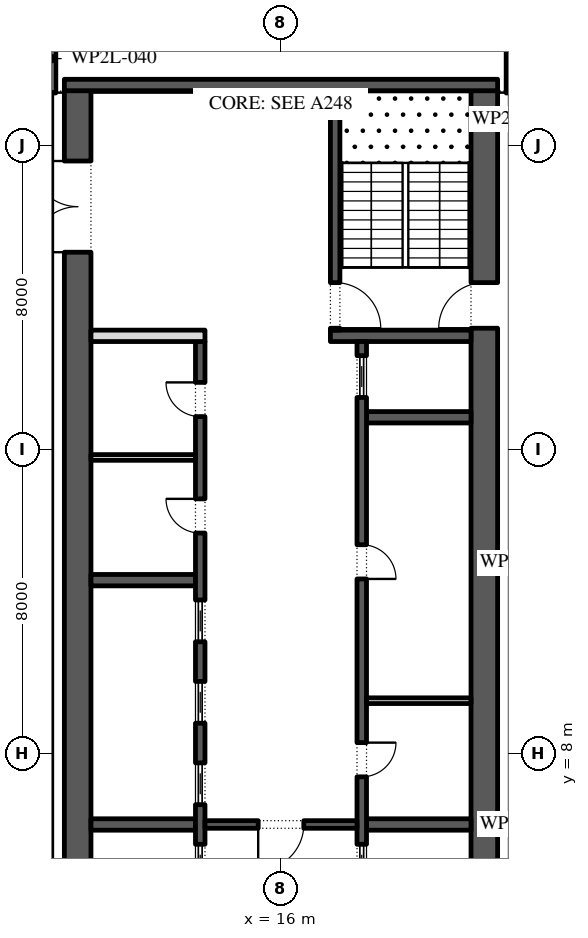
"""IFC4 building model, lengths in metres.
Left out: names, types, materials, properties, quantities, classifications, styles, units other than length and angle.
Written with IfcOpenShell. Run it as: python <this file> out.ifc"""

import sys

from ifc_helpers import new_model, si_unit, direction, frame, frame_2d, origin, place, context, subcontext, project, spatial, rectangle, extrude, element, fill, save


model = new_model("IFC4")
c1 = context("Model", 3, precision=1e-05, world=origin(), true_north=direction((0.0, 1.0)))
c2 = subcontext(c1, "Body", "Model", "MODEL_VIEW")
j1 = project(units=[si_unit("LENGTHUNIT", "METRE"), si_unit("PLANEANGLEUNIT", "RADIAN")], contexts=[c1])
p1 = place(None, origin())
s1 = spatial("IfcSite", under=j1, at=p1, CompositionType="ELEMENT")
p2 = place(p1, origin())
s2 = spatial("IfcBuilding", under=s1, at=p2, CompositionType="ELEMENT")
p3 = place(p2, frame((0.0, 0.0, 205.2)))
s3 = spatial("IfcBuildingStorey", under=s2, at=p3, CompositionType="ELEMENT", Elevation=205.2)
p4 = place(p3, frame((33.157, -5.092, 0.0), z_axis=(0.0, 0.0, 1.0), x_axis=(-0.224950279389, 0.974370243697, 0.0)))
e1 = element("IfcWall", 1, at=p4, inside=s3, PredefinedType="STANDARD", context=c2, shape_type="SweptSolid", body=[
    extrude(rectangle(XDim=49.5, YDim=0.3, at=frame_2d((24.75, 0.0))), origin(), (0.0, 0.0, 1.0), 4.0),
])
p5 = place(p4, frame((2.207, 0.0, 0.0)))
e2 = element("IfcOpeningElement", 2, at=p5, cuts=e1, PredefinedType="OPENING", context=c2, shape_type="SweptSolid", body=[
    extrude(rectangle(XDim=2.4, YDim=3.125, at=frame_2d((1.2, 1.562))), frame((0.0, 0.16, 0.0), z_axis=(0.0, -1.0, 0.0), x_axis=(1.0, 0.0, 0.0)), (0.0, 0.0, 1.0), 0.32),
])
p6 = place(p4, frame((8.121, 0.0, 0.45)))
e3 = element("IfcOpeningElement", 3, at=p6, cuts=e1, PredefinedType="OPENING", context=c2, shape_type="SweptSolid", body=[
    extrude(rectangle(XDim=4.5, YDim=2.875, at=frame_2d((2.25, 1.438))), frame((0.0, 0.16, 0.0), z_axis=(0.0, -1.0, 0.0), x_axis=(1.0, 0.0, 0.0)), (0.0, 0.0, 1.0), 0.32),
])
p7 = place(p4, frame((15.236, 0.0, 0.45)))
e4 = element("IfcOpeningElement", 4, at=p7, cuts=e1, PredefinedType="OPENING", context=c2, shape_type="SweptSolid", body=[
    extrude(rectangle(XDim=4.5, YDim=2.875, at=frame_2d((2.25, 1.438))), frame((0.0, 0.16, 0.0), z_axis=(0.0, -1.0, 0.0), x_axis=(1.0, 0.0, 0.0)), (0.0, 0.0, 1.0), 0.32),
])
p8 = place(p4, frame((22.35, 0.0, 0.45)))
e5 = element("IfcOpeningElement", 5, at=p8, cuts=e1, PredefinedType="OPENING", context=c2, shape_type="SweptSolid", body=[
    extrude(rectangle(XDim=4.5, YDim=3.0, at=frame_2d((2.25, 1.5))), frame((0.0, 0.16, 0.0), z_axis=(0.0, -1.0, 0.0), x_axis=(1.0, 0.0, 0.0)), (0.0, 0.0, 1.0), 0.32),
])
p9 = place(p4, frame((30.514, 0.0, 0.0)))
e6 = element("IfcOpeningElement", 6, at=p9, cuts=e1, PredefinedType="OPENING", context=c2, shape_type="SweptSolid", body=[
    extrude(rectangle(XDim=2.4, YDim=3.45, at=frame_2d((1.2, 1.725))), frame((0.0, 0.16, 0.0), z_axis=(0.0, -1.0, 0.0), x_axis=(1.0, 0.0, 0.0)), (0.0, 0.0, 1.0), 0.32),
])
p10 = place(p4, frame((36.579, 0.0, 0.45)))
e7 = element("IfcOpeningElement", 7, at=p10, cuts=e1, PredefinedType="OPENING", context=c2, shape_type="SweptSolid", body=[
    extrude(rectangle(XDim=4.5, YDim=3.05, at=frame_2d((2.25, 1.525))), frame((0.0, 0.16, 0.0), z_axis=(0.0, -1.0, 0.0), x_axis=(1.0, 0.0, 0.0)), (0.0, 0.0, 1.0), 0.32),
])
p11 = place(p4, frame((43.693, 0.0, 0.45)))
e8 = element("IfcOpeningElement", 8, at=p11, cuts=e1, PredefinedType="OPENING", context=c2, shape_type="SweptSolid", body=[
    extrude(rectangle(XDim=4.5, YDim=3.05, at=frame_2d((2.25, 1.525))), frame((0.0, 0.16, 0.0), z_axis=(0.0, -1.0, 0.0), x_axis=(1.0, 0.0, 0.0)), (0.0, 0.0, 1.0), 0.32),
])
p12 = place(p3, frame((21.35, -2.45, 0.0), z_axis=(0.0, 0.0, 1.0), x_axis=(0.0, 1.0, 0.0)))
e9 = element("IfcWall", 9, at=p12, inside=s3, PredefinedType="SHEAR", context=c2, shape_type="SweptSolid", body=[
    extrude(rectangle(XDim=27.9, YDim=0.7, at=frame_2d((13.95, 0.0))), origin(), (0.0, 0.0, 1.0), 4.0),
])
p13 = place(p12, frame((5.05, 0.0, 0.0)))
e10 = element("IfcOpeningElement", 10, at=p13, cuts=e9, PredefinedType="OPENING", context=c2, shape_type="SweptSolid", body=[
    extrude(rectangle(XDim=1.2, YDim=2.1, at=frame_2d((0.6, 1.05))), frame((0.0, 0.36, 0.0), z_axis=(0.0, -1.0, 0.0), x_axis=(1.0, 0.0, 0.0)), (0.0, 0.0, 1.0), 0.72),
])
p14 = place(p12, frame((21.65, 0.0, 0.0)))
e11 = element("IfcOpeningElement", 11, at=p14, cuts=e9, PredefinedType="OPENING", context=c2, shape_type="SweptSolid", body=[
    extrude(rectangle(XDim=1.2, YDim=2.1, at=frame_2d((0.6, 1.05))), frame((0.0, 0.36, 0.0), z_axis=(0.0, -1.0, 0.0), x_axis=(1.0, 0.0, 0.0)), (0.0, 0.0, 1.0), 0.72),
])
p15 = place(p3, frame((10.65, -2.45, 0.0), z_axis=(0.0, 0.0, 1.0), x_axis=(0.0, 1.0, 0.0)))
e12 = element("IfcWall", 12, at=p15, inside=s3, PredefinedType="SHEAR", context=c2, shape_type="SweptSolid", body=[
    extrude(rectangle(XDim=27.9, YDim=0.7, at=frame_2d((13.95, 0.0))), origin(), (0.0, 0.0, 1.0), 4.0),
])
p16 = place(p15, frame((23.65, 0.0, 0.0)))
e13 = element("IfcOpeningElement", 13, at=p16, cuts=e12, PredefinedType="OPENING", context=c2, shape_type="SweptSolid", body=[
    extrude(rectangle(XDim=2.4, YDim=2.1, at=frame_2d((1.2, 1.05))), frame((0.0, 0.36, 0.0), z_axis=(0.0, -1.0, 0.0), x_axis=(1.0, 0.0, 0.0)), (0.0, 0.0, 1.0), 0.72),
])
p17 = place(p15, frame((1.087, 0.0, 0.0)))
e14 = element("IfcOpeningElement", 14, at=p17, cuts=e12, PredefinedType="OPENING", context=c2, shape_type="SweptSolid", body=[
    extrude(rectangle(XDim=0.9, YDim=2.1, at=frame_2d((0.45, 1.05))), frame((0.0, 0.36, 0.0), z_axis=(0.0, -1.0, 0.0), x_axis=(1.0, 0.0, 0.0)), (0.0, 0.0, 1.0), 0.72),
])
p18 = place(p15, frame((4.262, 0.0, 0.0)))
e15 = element("IfcOpeningElement", 15, at=p18, cuts=e12, PredefinedType="OPENING", context=c2, shape_type="SweptSolid", body=[
    extrude(rectangle(XDim=1.0, YDim=2.1, at=frame_2d((0.5, 1.05))), frame((0.0, 0.36, 0.0), z_axis=(0.0, -1.0, 0.0), x_axis=(1.0, 0.0, 0.0)), (0.0, 0.0, 1.0), 0.72),
])
p19 = place(p3, frame((10.3, 25.6, 0.0), z_axis=(0.0, 0.0, 1.0), x_axis=(1.0, 0.0, 0.0)))
e16 = element("IfcWall", 16, at=p19, inside=s3, PredefinedType="SHEAR", context=c2, shape_type="SweptSolid", body=[
    extrude(rectangle(XDim=11.4, YDim=0.3, at=frame_2d((5.7, 0.0))), origin(), (0.0, 0.0, 1.0), 4.0),
])
p20 = place(p3, frame((17.3, 19.0, 0.0), z_axis=(0.0, 0.0, 1.0), x_axis=(1.0, 0.0, 0.0)))
e17 = element("IfcWall", 17, at=p20, inside=s3, PredefinedType="SHEAR", context=c2, shape_type="SweptSolid", body=[
    extrude(rectangle(XDim=3.7, YDim=0.3, at=frame_2d((1.85, 0.0))), origin(), (0.0, 0.0, 1.0), 4.0),
])
p21 = place(p3, frame((17.425, 19.15, 0.0), z_axis=(0.0, 0.0, 1.0), x_axis=(0.0, 1.0, 0.0)))
e18 = element("IfcWall", 18, at=p21, inside=s3, PredefinedType="SHEAR", context=c2, shape_type="SweptSolid", body=[
    extrude(rectangle(XDim=6.3, YDim=0.25, at=frame_2d((3.15, 0.0))), origin(), (0.0, 0.0, 1.0), 4.0),
])
p22 = place(p21, frame((0.05, 0.0, 0.0)))
e19 = element("IfcOpeningElement", 19, at=p22, cuts=e18, PredefinedType="OPENING", context=c2, shape_type="SweptSolid", body=[
    extrude(rectangle(XDim=1.2, YDim=2.1, at=frame_2d((0.6, 1.05))), frame((0.0, 0.135, 0.0), z_axis=(0.0, -1.0, 0.0), x_axis=(1.0, 0.0, 0.0)), (0.0, 0.0, 1.0), 0.27),
])
for number, where, z_axis, x_axis in (
    (20, (18.25, 6.143, 0.0), (0.0, 0.0, 1.0), (1.0, 0.0, 0.0)),
    (21, (18.25, 16.857, 0.0), (0.0, 0.0, 1.0), (1.0, 0.0, 0.0)),
):
    element("IfcWall", number, at=place(p3, frame(where, z_axis=z_axis, x_axis=x_axis)), inside=s3, PredefinedType="SHEAR", context=c2, shape_type="SweptSolid", body=[
        extrude(rectangle(XDim=2.75, YDim=0.3, at=frame_2d((1.375, 0.0))), origin(), (0.0, 0.0, 1.0), 4.0),
    ])
p23 = place(p3, frame((18.125, 4.15, 0.0), z_axis=(0.0, 0.0, 1.0), x_axis=(0.0, 1.0, 0.0)))
e22 = element("IfcWall", 22, at=p23, inside=s3, PredefinedType="SHEAR", context=c2, shape_type="SweptSolid", body=[
    extrude(rectangle(XDim=14.7, YDim=0.25, at=frame_2d((7.35, 0.0))), origin(), (0.0, 0.0, 1.0), 4.0),
])
p24 = place(p23, frame((3.246, 0.0, 0.0)))
e23 = element("IfcOpeningElement", 23, at=p24, cuts=e22, PredefinedType="OPENING", context=c2, shape_type="SweptSolid", body=[
    extrude(rectangle(XDim=0.9, YDim=2.1, at=frame_2d((0.45, 1.05))), frame((0.0, 0.135, 0.0), z_axis=(0.0, -1.0, 0.0), x_axis=(1.0, 0.0, 0.0)), (0.0, 0.0, 1.0), 0.27),
])
p25 = place(p23, frame((8.454, 0.0, 0.0)))
e24 = element("IfcOpeningElement", 24, at=p25, cuts=e22, PredefinedType="OPENING", context=c2, shape_type="SweptSolid", body=[
    extrude(rectangle(XDim=0.9, YDim=2.1, at=frame_2d((0.45, 1.05))), frame((0.0, 0.135, 0.0), z_axis=(0.0, -1.0, 0.0), x_axis=(1.0, 0.0, 0.0)), (0.0, 0.0, 1.0), 0.27),
])
p26 = place(p23, frame((0.371, 0.0, 0.0)))
e25 = element("IfcOpeningElement", 25, at=p26, cuts=e22, PredefinedType="OPENING", context=c2, shape_type="SweptSolid", body=[
    extrude(rectangle(XDim=1.1, YDim=2.1, at=frame_2d((0.55, 1.05))), frame((0.0, 0.135, 0.0), z_axis=(0.0, -1.0, 0.0), x_axis=(1.0, 0.0, 0.0)), (0.0, 0.0, 1.0), 0.27),
])
p27 = place(p23, frame((13.229, 0.0, 0.0)))
e26 = element("IfcOpeningElement", 26, at=p27, cuts=e22, PredefinedType="OPENING", context=c2, shape_type="SweptSolid", body=[
    extrude(rectangle(XDim=1.1, YDim=2.1, at=frame_2d((0.55, 1.05))), frame((0.0, 0.135, 0.0), z_axis=(0.0, -1.0, 0.0), x_axis=(1.0, 0.0, 0.0)), (0.0, 0.0, 1.0), 0.27),
])
p28 = place(p3, frame((18.25, 9.4, 0.0), z_axis=(0.0, 0.0, 1.0), x_axis=(1.0, 0.0, 0.0)))
e27 = element("IfcWall", 27, at=p28, inside=s3, PredefinedType="PARTITIONING", context=c2, shape_type="SweptSolid", body=[
    extrude(rectangle(XDim=2.75, YDim=0.15, at=frame_2d((1.375, 0.0))), origin(), (0.0, 0.0, 1.0), 4.0),
])
for number, where, z_axis, x_axis in (
    (28, (11.0, 6.143, 0.0), (0.0, 0.0, 1.0), (1.0, 0.0, 0.0)),
    (29, (11.0, 12.571, 0.0), (0.0, 0.0, 1.0), (1.0, 0.0, 0.0)),
):
    element("IfcWall", number, at=place(p3, frame(where, z_axis=z_axis, x_axis=x_axis)), inside=s3, PredefinedType="SHEAR", context=c2, shape_type="SweptSolid", body=[
        extrude(rectangle(XDim=2.75, YDim=0.3, at=frame_2d((1.375, 0.0))), origin(), (0.0, 0.0, 1.0), 4.0),
    ])
p29 = place(p3, frame((13.875, -2.45, 0.0), z_axis=(0.0, 0.0, 1.0), x_axis=(0.0, 1.0, 0.0)))
e30 = element("IfcWall", 30, at=p29, inside=s3, PredefinedType="SHEAR", context=c2, shape_type="SweptSolid", body=[
    extrude(rectangle(XDim=21.3, YDim=0.25, at=frame_2d((10.65, 0.0))), origin(), (0.0, 0.0, 1.0), 4.0),
])
p30 = place(p29, frame((16.261, 0.0, 0.0)))
e31 = element("IfcOpeningElement", 31, at=p30, cuts=e30, PredefinedType="OPENING", context=c2, shape_type="SweptSolid", body=[
    extrude(rectangle(XDim=0.9, YDim=2.1, at=frame_2d((0.45, 1.05))), frame((0.0, 0.135, 0.0), z_axis=(0.0, -1.0, 0.0), x_axis=(1.0, 0.0, 0.0)), (0.0, 0.0, 1.0), 0.27),
])
p31 = place(p29, frame((19.325, 0.0, 0.0)))
e32 = element("IfcOpeningElement", 32, at=p31, cuts=e30, PredefinedType="OPENING", context=c2, shape_type="SweptSolid", body=[
    extrude(rectangle(XDim=0.9, YDim=2.1, at=frame_2d((0.45, 1.05))), frame((0.0, 0.135, 0.0), z_axis=(0.0, -1.0, 0.0), x_axis=(1.0, 0.0, 0.0)), (0.0, 0.0, 1.0), 0.27),
])
p32 = place(p29, frame((6.971, 0.0, 0.0)))
e33 = element("IfcOpeningElement", 33, at=p32, cuts=e30, PredefinedType="OPENING", context=c2, shape_type="SweptSolid", body=[
    extrude(rectangle(XDim=1.1, YDim=2.1, at=frame_2d((0.55, 1.05))), frame((0.0, 0.135, 0.0), z_axis=(0.0, -1.0, 0.0), x_axis=(1.0, 0.0, 0.0)), (0.0, 0.0, 1.0), 0.27),
])
p33 = place(p29, frame((9.114, 0.0, 0.0)))
e34 = element("IfcOpeningElement", 34, at=p33, cuts=e30, PredefinedType="OPENING", context=c2, shape_type="SweptSolid", body=[
    extrude(rectangle(XDim=1.1, YDim=2.1, at=frame_2d((0.55, 1.05))), frame((0.0, 0.135, 0.0), z_axis=(0.0, -1.0, 0.0), x_axis=(1.0, 0.0, 0.0)), (0.0, 0.0, 1.0), 0.27),
])
p34 = place(p29, frame((11.257, 0.0, 0.0)))
e35 = element("IfcOpeningElement", 35, at=p34, cuts=e30, PredefinedType="OPENING", context=c2, shape_type="SweptSolid", body=[
    extrude(rectangle(XDim=1.1, YDim=2.1, at=frame_2d((0.55, 1.05))), frame((0.0, 0.135, 0.0), z_axis=(0.0, -1.0, 0.0), x_axis=(1.0, 0.0, 0.0)), (0.0, 0.0, 1.0), 0.27),
])
p35 = place(p29, frame((13.4, 0.0, 0.0)))
e36 = element("IfcOpeningElement", 36, at=p35, cuts=e30, PredefinedType="OPENING", context=c2, shape_type="SweptSolid", body=[
    extrude(rectangle(XDim=1.1, YDim=2.1, at=frame_2d((0.55, 1.05))), frame((0.0, 0.135, 0.0), z_axis=(0.0, -1.0, 0.0), x_axis=(1.0, 0.0, 0.0)), (0.0, 0.0, 1.0), 0.27),
])
p36 = place(p3, frame((11.0, 19.0, 0.0), z_axis=(0.0, 0.0, 1.0), x_axis=(1.0, 0.0, 0.0)))
e37 = element("IfcWall", 37, at=p36, inside=s3, PredefinedType="PARTITIONING", context=c2, shape_type="SweptSolid", body=[
    extrude(rectangle(XDim=3.0, YDim=0.3, at=frame_2d((1.5, 0.0))), origin(), (0.0, 0.0, 1.0), 4.0),
])
p37 = place(p3, frame((11.0, 15.8, 0.0), z_axis=(0.0, 0.0, 1.0), x_axis=(1.0, 0.0, 0.0)))
e38 = element("IfcWall", 38, at=p37, inside=s3, PredefinedType="PARTITIONING", context=c2, shape_type="SweptSolid", body=[
    extrude(rectangle(XDim=2.75, YDim=0.15, at=frame_2d((1.375, 0.0))), origin(), (0.0, 0.0, 1.0), 4.0),
])
p38 = place(p3, frame((14.0, 6.143, 0.0), z_axis=(0.0, 0.0, 1.0), x_axis=(1.0, 0.0, 0.0)))
e39 = element("IfcWall", 39, at=p38, inside=s3, PredefinedType="SHEAR", context=c2, shape_type="SweptSolid", body=[
    extrude(rectangle(XDim=4.0, YDim=0.2, at=frame_2d((2.0, 0.0))), origin(), (0.0, 0.0, 1.0), 4.0),
])
p39 = place(p38, frame((1.4, 0.0, 0.0)))
e40 = element("IfcOpeningElement", 40, at=p39, cuts=e39, PredefinedType="OPENING", context=c2, shape_type="SweptSolid", body=[
    extrude(rectangle(XDim=1.2, YDim=2.1, at=frame_2d((0.6, 1.05))), frame((0.0, 0.11, 0.0), z_axis=(0.0, -1.0, 0.0), x_axis=(1.0, 0.0, 0.0)), (0.0, 0.0, 1.0), 0.22),
])
p40 = place(p3, frame((10.0, 27.2, 0.0), z_axis=(0.0, 0.0, 1.0), x_axis=(0.0, -1.0, 0.0)))
e41 = element("IfcWall", 41, at=p40, inside=s3, PredefinedType="PARTITIONING", context=c2, shape_type="SweptSolid", body=[
    extrude(rectangle(XDim=1.81, YDim=0.15, at=frame_2d((0.905, 0.0))), origin(), (0.0, 0.0, 1.0), 3.02),
])
p41 = place(p3, frame((22.0, 25.39, 0.0), z_axis=(0.0, 0.0, 1.0), x_axis=(0.0, 1.0, 0.0)))
e42 = element("IfcWall", 42, at=p41, inside=s3, PredefinedType="PARTITIONING", context=c2, shape_type="SweptSolid", body=[
    extrude(rectangle(XDim=1.81, YDim=0.15, at=frame_2d((0.905, 0.0))), origin(), (0.0, 0.0, 1.0), 4.0),
])
p42 = place(p24, frame((0.9, -0.2, 0.0), z_axis=(0.0, 0.0, 1.0), x_axis=(-1.0, 0.0, 0.0)))
e43 = element("IfcDoor", 43, at=p42, inside=s3, OperationType="SINGLE_SWING_RIGHT", PredefinedType="DOOR", context=c2, shape_type="SweptSolid", body=[
    extrude(rectangle(XDim=0.9, YDim=2.1, at=frame_2d((0.45, 1.05))), frame((0.0, -0.075, 0.0), z_axis=(0.0, -1.0, 0.0), x_axis=(1.0, 0.0, 0.0)), (0.0, 0.0, 1.0), 0.05),
])
fill(e23, e43)
p43 = place(p25, frame((0.9, -0.2, 0.0), z_axis=(0.0, 0.0, 1.0), x_axis=(-1.0, 0.0, 0.0)))
e44 = element("IfcDoor", 44, at=p43, inside=s3, OperationType="SINGLE_SWING_LEFT", PredefinedType="DOOR", context=c2, shape_type="SweptSolid", body=[
    extrude(rectangle(XDim=0.9, YDim=2.1, at=frame_2d((0.45, 1.05))), frame((0.0, -0.075, 0.0), z_axis=(0.0, -1.0, 0.0), x_axis=(1.0, 0.0, 0.0)), (0.0, 0.0, 1.0), 0.05),
])
fill(e24, e44)
p44 = place(p26, origin())
e45 = element("IfcDoor", 45, at=p44, inside=s3, OperationType="SLIDING_TO_LEFT", PredefinedType="DOOR", context=c2, shape_type="SweptSolid", body=[
    extrude(rectangle(XDim=1.1, YDim=2.1, at=frame_2d((0.55, 1.05))), frame((0.0, 0.025, 0.0), z_axis=(0.0, -1.0, 0.0), x_axis=(1.0, 0.0, 0.0)), (0.0, 0.0, 1.0), 0.05),
])
fill(e25, e45)
p45 = place(p27, origin())
e46 = element("IfcDoor", 46, at=p45, inside=s3, OperationType="SLIDING_TO_LEFT", PredefinedType="DOOR", context=c2, shape_type="SweptSolid", body=[
    extrude(rectangle(XDim=1.1, YDim=2.1, at=frame_2d((0.55, 1.05))), frame((0.0, 0.025, 0.0), z_axis=(0.0, -1.0, 0.0), x_axis=(1.0, 0.0, 0.0)), (0.0, 0.0, 1.0), 0.05),
])
fill(e26, e46)
p46 = place(p30, origin())
e47 = element("IfcDoor", 47, at=p46, inside=s3, OperationType="SINGLE_SWING_LEFT", PredefinedType="DOOR", context=c2, shape_type="SweptSolid", body=[
    extrude(rectangle(XDim=0.9, YDim=2.1, at=frame_2d((0.45, 1.05))), frame((0.0, 0.125, 0.0), z_axis=(0.0, -1.0, 0.0), x_axis=(1.0, 0.0, 0.0)), (0.0, 0.0, 1.0), 0.05),
])
fill(e31, e47)
p47 = place(p31, origin())
e48 = element("IfcDoor", 48, at=p47, inside=s3, OperationType="SINGLE_SWING_LEFT", PredefinedType="DOOR", context=c2, shape_type="SweptSolid", body=[
    extrude(rectangle(XDim=0.9, YDim=2.1, at=frame_2d((0.45, 1.05))), frame((0.0, 0.125, 0.0), z_axis=(0.0, -1.0, 0.0), x_axis=(1.0, 0.0, 0.0)), (0.0, 0.0, 1.0), 0.05),
])
fill(e32, e48)
p48 = place(p32, origin())
e49 = element("IfcDoor", 49, at=p48, inside=s3, OperationType="SLIDING_TO_LEFT", PredefinedType="DOOR", context=c2, shape_type="SweptSolid", body=[
    extrude(rectangle(XDim=1.1, YDim=2.1, at=frame_2d((0.55, 1.05))), frame((0.0, 0.025, 0.0), z_axis=(0.0, -1.0, 0.0), x_axis=(1.0, 0.0, 0.0)), (0.0, 0.0, 1.0), 0.05),
])
fill(e33, e49)
p49 = place(p33, origin())
e50 = element("IfcDoor", 50, at=p49, inside=s3, OperationType="SLIDING_TO_LEFT", PredefinedType="DOOR", context=c2, shape_type="SweptSolid", body=[
    extrude(rectangle(XDim=1.1, YDim=2.1, at=frame_2d((0.55, 1.05))), frame((0.0, 0.025, 0.0), z_axis=(0.0, -1.0, 0.0), x_axis=(1.0, 0.0, 0.0)), (0.0, 0.0, 1.0), 0.05),
])
fill(e34, e50)
p50 = place(p34, origin())
e51 = element("IfcDoor", 51, at=p50, inside=s3, OperationType="SLIDING_TO_LEFT", PredefinedType="DOOR", context=c2, shape_type="SweptSolid", body=[
    extrude(rectangle(XDim=1.1, YDim=2.1, at=frame_2d((0.55, 1.05))), frame((0.0, 0.025, 0.0), z_axis=(0.0, -1.0, 0.0), x_axis=(1.0, 0.0, 0.0)), (0.0, 0.0, 1.0), 0.05),
])
fill(e35, e51)
p51 = place(p35, origin())
e52 = element("IfcDoor", 52, at=p51, inside=s3, OperationType="SLIDING_TO_LEFT", PredefinedType="DOOR", context=c2, shape_type="SweptSolid", body=[
    extrude(rectangle(XDim=1.1, YDim=2.1, at=frame_2d((0.55, 1.05))), frame((0.0, 0.025, 0.0), z_axis=(0.0, -1.0, 0.0), x_axis=(1.0, 0.0, 0.0)), (0.0, 0.0, 1.0), 0.05),
])
fill(e36, e52)
p52 = place(p39, frame((1.2, 0.0, 0.0), z_axis=(0.0, 0.0, 1.0), x_axis=(-1.0, 0.0, 0.0)))
e53 = element("IfcDoor", 53, at=p52, inside=s3, OperationType="SINGLE_SWING_LEFT", PredefinedType="DOOR", context=c2, shape_type="SweptSolid", body=[
    extrude(rectangle(XDim=1.2, YDim=2.1, at=frame_2d((0.6, 1.05))), frame((0.0, 0.025, 0.0), z_axis=(0.0, -1.0, 0.0), x_axis=(1.0, 0.0, 0.0)), (0.0, 0.0, 1.0), 0.05),
])
fill(e40, e53)
p53 = place(p16, origin())
e54 = element("IfcDoor", 54, at=p53, inside=s3, OperationType="DOUBLE_DOOR_SINGLE_SWING", PredefinedType="DOOR", context=c2, shape_type="SweptSolid", body=[
    extrude(rectangle(XDim=2.4, YDim=2.1, at=frame_2d((1.2, 1.05))), frame((0.0, 0.025, 0.0), z_axis=(0.0, -1.0, 0.0), x_axis=(1.0, 0.0, 0.0)), (0.0, 0.0, 1.0), 0.05),
])
fill(e13, e54)
p54 = place(p22, frame((1.2, 0.0, 0.0), z_axis=(0.0, 0.0, 1.0), x_axis=(-1.0, 0.0, 0.0)))
e55 = element("IfcDoor", 55, at=p54, inside=s3, OperationType="SINGLE_SWING_LEFT", PredefinedType="DOOR", context=c2, shape_type="SweptSolid", body=[
    extrude(rectangle(XDim=1.2, YDim=2.1, at=frame_2d((0.6, 1.05))), frame((0.0, 0.025, 0.0), z_axis=(0.0, -1.0, 0.0), x_axis=(1.0, 0.0, 0.0)), (0.0, 0.0, 1.0), 0.05),
])
fill(e19, e55)
p55 = place(p14, origin())
e56 = element("IfcDoor", 56, at=p55, inside=s3, OperationType="SINGLE_SWING_RIGHT", PredefinedType="DOOR", context=c2, shape_type="SweptSolid", body=[
    extrude(rectangle(XDim=1.2, YDim=2.1, at=frame_2d((0.6, 1.05))), frame((0.0, 0.025, 0.0), z_axis=(0.0, -1.0, 0.0), x_axis=(1.0, 0.0, 0.0)), (0.0, 0.0, 1.0), 0.05),
])
fill(e11, e56)
save(model, sys.argv[1])
